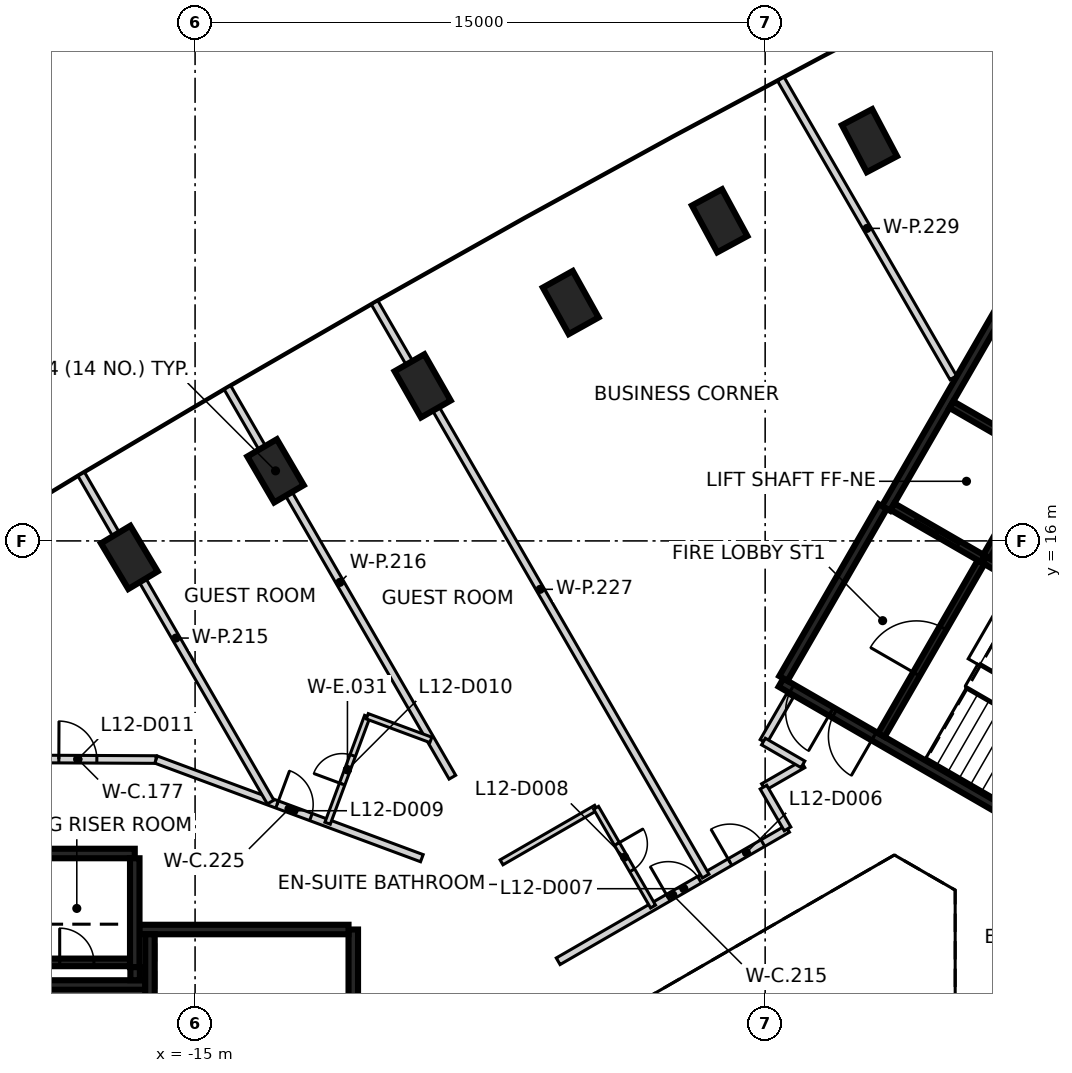
"""IFC4 building model, lengths in metres.
Left out: names, types, materials, properties, quantities, classifications, styles, units other than length and angle.
Written with IfcOpenShell. Run it as: python <this file> out.ifc"""

import sys

from ifc_helpers import new_model, si_unit, direction, frame, frame_2d, origin, origin_2d, place, context, subcontext, project, spatial, rectangle, extrude, element, fill, save


model = new_model("IFC4")
c1 = context("Model", 3, precision=1e-05, world=origin(), true_north=direction((0.0, 1.0)))
c2 = subcontext(c1, "Body", "Model", "MODEL_VIEW")
j1 = project(units=[si_unit("LENGTHUNIT", "METRE"), si_unit("PLANEANGLEUNIT", "RADIAN")], contexts=[c1])
p1 = place(None, origin())
s1 = spatial("IfcSite", under=j1, at=p1, CompositionType="ELEMENT")
p2 = place(p1, origin())
s2 = spatial("IfcBuilding", under=s1, at=p2, CompositionType="ELEMENT")
p3 = place(p2, frame((0.0, 0.0, 56.6)))
s3 = spatial("IfcBuildingStorey", under=s2, at=p3, CompositionType="ELEMENT", Elevation=56.6)
for number, where, z_axis, x_axis in (
    (1, (2.745, 26.531, -0.475), (0.0, 0.0, 1.0), (-0.467, 0.884, 0.0)),
    (2, (-1.197, 24.423, -0.475), (0.0, 0.0, 1.0), (-0.476, 0.879, 0.0)),
    (3, (-5.116, 22.272, -0.475), (0.0, 0.0, 1.0), (-0.486, 0.874, 0.0)),
    (4, (-9.011, 20.079, -0.475), (0.0, 0.0, 1.0), (-0.495, 0.869, 0.0)),
    (5, (-12.883, 17.844, -0.475), (0.0, 0.0, 1.0), (-0.505, 0.863, 0.0)),
    (6, (-16.73, 15.566, -0.475), (0.0, 0.0, 1.0), (-0.514, 0.858, 0.0)),
):
    element("IfcColumn", number, at=place(p3, frame(where, z_axis=z_axis, x_axis=x_axis)), inside=s3, PredefinedType="COLUMN", context=c2, shape_type="SweptSolid", body=[
        extrude(rectangle(XDim=1.4, YDim=0.9, at=origin_2d()), origin(), (0.0, 0.0, 1.0), 3.6),
    ])
p4 = place(p3, frame((-10.837, 5.775, 0.0), z_axis=(0.0, 0.0, 1.0), x_axis=(0.0, -1.0, 0.0)))
e7 = element("IfcWall", 7, at=p4, inside=s3, PredefinedType="SHEAR", context=c2, shape_type="SweptSolid", body=[
    extrude(rectangle(XDim=11.55, YDim=0.25, at=frame_2d((5.775, 0.0))), origin(), (0.0, 0.0, 1.0), 3.125),
])
p5 = place(p4, frame((10.025, 0.0, 0.0)))
e8 = element("IfcOpeningElement", 8, at=p5, cuts=e7, PredefinedType="OPENING", context=c2, shape_type="SweptSolid", body=[
    extrude(rectangle(XDim=1.2, YDim=2.1, at=frame_2d((0.6, 1.05))), frame((0.0, 0.135, 0.0), z_axis=(0.0, -1.0, 0.0), x_axis=(1.0, 0.0, 0.0)), (0.0, 0.0, 1.0), 0.27),
])
p6 = place(p4, frame((8.725, 0.0, 0.0)))
e9 = element("IfcOpeningElement", 9, at=p6, cuts=e7, PredefinedType="OPENING", context=c2, shape_type="SweptSolid", body=[
    extrude(rectangle(XDim=1.2, YDim=2.1, at=frame_2d((0.6, 1.05))), frame((0.0, 0.135, 0.0), z_axis=(0.0, -1.0, 0.0), x_axis=(1.0, 0.0, 0.0)), (0.0, 0.0, 1.0), 0.27),
])
p7 = place(p3, frame((-16.472, 5.775, 0.0), z_axis=(0.0, 0.0, 1.0), x_axis=(1.0, 0.0, 0.0)))
e10 = element("IfcWall", 10, at=p7, inside=s3, PredefinedType="SHEAR", context=c2, shape_type="SweptSolid", body=[
    extrude(rectangle(XDim=5.51, YDim=0.25, at=frame_2d((2.755, 0.0))), origin(), (0.0, 0.0, 1.0), 3.125),
])
p8 = place(p3, frame((-19.637, 7.775, 0.0), z_axis=(0.0, 0.0, 1.0), x_axis=(1.0, 0.0, 0.0)))
e11 = element("IfcWall", 11, at=p8, inside=s3, PredefinedType="SHEAR", context=c2, shape_type="SweptSolid", body=[
    extrude(rectangle(XDim=3.05, YDim=0.25, at=frame_2d((1.525, 0.0))), origin(), (0.0, 0.0, 1.0), 3.125),
])
p9 = place(p3, frame((-16.587, 7.65, 0.0), z_axis=(0.0, 0.0, 1.0), x_axis=(0.0, -1.0, 0.0)))
e12 = element("IfcWall", 12, at=p9, inside=s3, PredefinedType="SHEAR", context=c2, shape_type="SweptSolid", body=[
    extrude(rectangle(XDim=2.865, YDim=0.25, at=frame_2d((1.432, 0.0))), origin(), (0.0, 0.0, 1.0), 3.125),
])
p10 = place(p3, frame((-16.302, 4.315, 0.0), z_axis=(0.0, 0.0, 1.0), x_axis=(-1.0, 0.0, 0.0)))
e13 = element("IfcWall", 13, at=p10, inside=s3, PredefinedType="SHEAR", context=c2, shape_type="SweptSolid", body=[
    extrude(rectangle(XDim=3.085, YDim=0.25, at=frame_2d((1.542, 0.0))), origin(), (0.0, 0.0, 1.0), 3.125),
])
p11 = place(p3, frame((-16.187, 3.2, 0.0), z_axis=(0.0, 0.0, 1.0), x_axis=(0.0, 1.0, 0.0)))
e14 = element("IfcWall", 14, at=p11, inside=s3, PredefinedType="SHEAR", context=c2, shape_type="SweptSolid", body=[
    extrude(rectangle(XDim=2.449, YDim=0.25, at=frame_2d((1.225, 0.0))), origin(), (0.0, 0.0, 1.0), 3.125),
])
p12 = place(p3, frame((-16.577, 4.785, 0.0), z_axis=(0.0, 0.0, 1.0), x_axis=(0.0, -1.0, 0.0)))
e15 = element("IfcWall", 15, at=p12, inside=s3, PredefinedType="SHEAR", context=c2, shape_type="SweptSolid", body=[
    extrude(rectangle(XDim=0.344, YDim=0.25, at=frame_2d((0.172, 0.0))), origin(), (0.0, 0.0, 1.0), 3.125),
])
p13 = place(p3, frame((-19.511, 4.91, 0.0), z_axis=(0.0, 0.0, 1.0), x_axis=(1.0, 0.0, 0.0)))
e16 = element("IfcWall", 16, at=p13, inside=s3, PredefinedType="SHEAR", context=c2, shape_type="SweptSolid", body=[
    extrude(rectangle(XDim=2.798, YDim=0.2, at=frame_2d((1.399, 0.0))), origin(), (0.0, 0.0, 1.0), 3.125),
])
p14 = place(p13, frame((0.949, 0.0, 0.0)))
e17 = element("IfcOpeningElement", 17, at=p14, cuts=e16, PredefinedType="OPENING", context=c2, shape_type="SweptSolid", body=[
    extrude(rectangle(XDim=0.9, YDim=2.1, at=frame_2d((0.45, 1.05))), frame((0.0, 0.11, 0.0), z_axis=(0.0, -1.0, 0.0), x_axis=(1.0, 0.0, 0.0)), (0.0, 0.0, 1.0), 0.22),
])
p15 = place(p3, frame((10.42, 6.498, 0.0), z_axis=(0.0, 0.0, 1.0), x_axis=(-0.866021906294, 0.500006057782, 0.0)))
e18 = element("IfcWall", 18, at=p15, inside=s3, PredefinedType="SHEAR", context=c2, shape_type="SweptSolid", body=[
    extrude(rectangle(XDim=11.55, YDim=0.25, at=frame_2d((5.775, 0.0))), origin(), (0.0, 0.0, 1.0), 3.125),
])
p16 = place(p15, frame((10.025, 0.0, 0.0)))
e19 = element("IfcOpeningElement", 19, at=p16, cuts=e18, PredefinedType="OPENING", context=c2, shape_type="SweptSolid", body=[
    extrude(rectangle(XDim=1.2, YDim=2.1, at=frame_2d((0.6, 1.05))), frame((0.0, 0.135, 0.0), z_axis=(0.0, -1.0, 0.0), x_axis=(1.0, 0.0, 0.0)), (0.0, 0.0, 1.0), 0.27),
])
p17 = place(p15, frame((8.725, 0.0, 0.0)))
e20 = element("IfcOpeningElement", 20, at=p17, cuts=e18, PredefinedType="OPENING", context=c2, shape_type="SweptSolid", body=[
    extrude(rectangle(XDim=1.2, YDim=2.1, at=frame_2d((0.6, 1.05))), frame((0.0, 0.135, 0.0), z_axis=(0.0, -1.0, 0.0), x_axis=(1.0, 0.0, 0.0)), (0.0, 0.0, 1.0), 0.27),
])
p18 = place(p3, frame((3.179, 16.856, 0.0), z_axis=(0.0, 0.0, 1.0), x_axis=(0.500004234368, 0.866022959057, 0.0)))
e21 = element("IfcWall", 21, at=p18, inside=s3, PredefinedType="SHEAR", context=c2, shape_type="SweptSolid", body=[
    extrude(rectangle(XDim=6.25, YDim=0.25, at=frame_2d((3.125, 0.0))), origin(), (0.0, 0.0, 1.0), 3.125),
])
p19 = place(p3, frame((0.48, 12.381, 0.0), z_axis=(0.0, 0.0, 1.0), x_axis=(0.49999885962, 0.866026062182, 0.0)))
e22 = element("IfcWall", 22, at=p19, inside=s3, PredefinedType="SHEAR", context=c2, shape_type="SweptSolid", body=[
    extrude(rectangle(XDim=5.225, YDim=0.25, at=frame_2d((2.612, 0.0))), origin(), (0.0, 0.0, 1.0), 3.125),
])
p20 = place(p3, frame((5.775, 15.502, 0.0), z_axis=(0.0, 0.0, 1.0), x_axis=(0.866020080793, -0.500009219579, 0.0)))
e23 = element("IfcWall", 23, at=p20, inside=s3, PredefinedType="SHEAR", context=c2, shape_type="SweptSolid", body=[
    extrude(rectangle(XDim=5.699, YDim=0.2, at=frame_2d((2.85, 0.0))), origin(), (0.0, 0.0, 1.0), 3.125),
])
p21 = place(p3, frame((3.057, 10.895, 0.0), z_axis=(0.0, 0.0, 1.0), x_axis=(0.499989418164, 0.866031513124, 0.0)))
e24 = element("IfcWall", 24, at=p21, inside=s3, PredefinedType="SHEAR", context=c2, shape_type="SweptSolid", body=[
    extrude(rectangle(XDim=5.251, YDim=0.2, at=frame_2d((2.625, 0.0))), origin(), (0.0, 0.0, 1.0), 3.125),
])
p22 = place(p21, frame((1.849, 0.0, 0.0)))
e25 = element("IfcOpeningElement", 25, at=p22, cuts=e24, PredefinedType="OPENING", context=c2, shape_type="SweptSolid", body=[
    extrude(rectangle(XDim=1.4, YDim=2.1, at=frame_2d((0.7, 1.05))), frame((0.0, 0.11, 0.0), z_axis=(0.0, -1.0, 0.0), x_axis=(1.0, 0.0, 0.0)), (0.0, 0.0, 1.0), 0.22),
])
p23 = place(p3, frame((7.199, 17.97, 0.0), z_axis=(0.0, 0.0, 1.0), x_axis=(-0.499968400327, -0.866043647095, 0.0)))
e26 = element("IfcWall", 26, at=p23, inside=s3, PredefinedType="SHEAR", context=c2, shape_type="SweptSolid", body=[
    extrude(rectangle(XDim=2.75, YDim=0.2, at=frame_2d((1.375, 0.0))), origin(), (0.0, 0.0, 1.0), 3.125),
])
p24 = place(p3, frame((5.725, 15.531, 0.0), z_axis=(0.0, 0.0, 1.0), x_axis=(-0.866037306777, 0.499979382845, 0.0)))
e27 = element("IfcWall", 27, at=p24, inside=s3, PredefinedType="SHEAR", context=c2, shape_type="SweptSolid", body=[
    extrude(rectangle(XDim=2.742, YDim=0.2, at=frame_2d((1.371, 0.0))), origin(), (0.0, 0.0, 1.0), 3.125),
])
p25 = place(p24, frame((0.743, 0.0, 0.0)))
e28 = element("IfcOpeningElement", 28, at=p25, cuts=e27, PredefinedType="OPENING", context=c2, shape_type="SweptSolid", body=[
    extrude(rectangle(XDim=1.3, YDim=2.1, at=frame_2d((0.65, 1.05))), frame((0.0, 0.11, 0.0), z_axis=(0.0, -1.0, 0.0), x_axis=(1.0, 0.0, 0.0)), (0.0, 0.0, 1.0), 0.22),
])
p26 = place(p3, frame((4.901, 19.586, 0.0), z_axis=(0.0, 0.0, 1.0), x_axis=(0.866022890907, -0.500004352405, 0.0)))
e29 = element("IfcWall", 29, at=p26, inside=s3, PredefinedType="SHEAR", context=c2, shape_type="SweptSolid", body=[
    extrude(rectangle(XDim=2.799, YDim=0.2, at=frame_2d((1.399, 0.0))), origin(), (0.0, 0.0, 1.0), 3.125),
])
p27 = place(p3, frame((-20.143, 10.266, 0.0), z_axis=(0.0, 0.0, 1.0), x_axis=(0.999989297417, -0.004626559416, 0.0)))
e30 = element("IfcWall", 30, at=p27, inside=s3, PredefinedType="PARTITIONING", context=c2, shape_type="SweptSolid", body=[
    extrude(rectangle(XDim=4.116, YDim=0.2, at=frame_2d((2.058, 0.0))), origin(), (0.0, 0.0, 1.0), 3.125),
])
p28 = place(p27, frame((1.558, 0.0, 0.0)))
e31 = element("IfcOpeningElement", 31, at=p28, cuts=e30, PredefinedType="OPENING", context=c2, shape_type="SweptSolid", body=[
    extrude(rectangle(XDim=1.0, YDim=2.1, at=frame_2d((0.5, 1.05))), frame((0.0, 0.11, 0.0), z_axis=(0.0, -1.0, 0.0), x_axis=(1.0, 0.0, 0.0)), (0.0, 0.0, 1.0), 0.22),
])
p29 = place(p3, frame((-16.026, 10.247, 0.0), z_axis=(0.0, 0.0, 1.0), x_axis=(0.937540909117, -0.347875040397, 0.0)))
e32 = element("IfcWall", 32, at=p29, inside=s3, PredefinedType="PARTITIONING", context=c2, shape_type="SweptSolid", body=[
    extrude(rectangle(XDim=7.459, YDim=0.2, at=frame_2d((3.729, 0.0))), origin(), (0.0, 0.0, 1.0), 3.125),
])
p30 = place(p29, frame((3.396, 0.0, 0.0)))
e33 = element("IfcOpeningElement", 33, at=p30, cuts=e32, PredefinedType="OPENING", context=c2, shape_type="SweptSolid", body=[
    extrude(rectangle(XDim=0.95, YDim=2.1, at=frame_2d((0.475, 1.05))), frame((0.0, 0.11, 0.0), z_axis=(0.0, -1.0, 0.0), x_axis=(1.0, 0.0, 0.0)), (0.0, 0.0, 1.0), 0.22),
])
p31 = place(p3, frame((-5.446, 4.94, 0.0), z_axis=(0.0, 0.0, 1.0), x_axis=(0.866096332545, 0.499877127655, 0.0)))
e34 = element("IfcWall", 34, at=p31, inside=s3, PredefinedType="PARTITIONING", context=c2, shape_type="SweptSolid", body=[
    extrude(rectangle(XDim=6.969, YDim=0.2, at=frame_2d((3.484, 0.0))), origin(), (0.0, 0.0, 1.0), 3.125),
])
p32 = place(p31, frame((5.219, 0.0, 0.0)))
e35 = element("IfcOpeningElement", 35, at=p32, cuts=e34, PredefinedType="OPENING", context=c2, shape_type="SweptSolid", body=[
    extrude(rectangle(XDim=1.0, YDim=2.1, at=frame_2d((0.5, 1.05))), frame((0.0, 0.11, 0.0), z_axis=(0.0, -1.0, 0.0), x_axis=(1.0, 0.0, 0.0)), (0.0, 0.0, 1.0), 0.22),
])
p33 = place(p31, frame((3.344, 0.0, 0.0)))
e36 = element("IfcOpeningElement", 36, at=p33, cuts=e34, PredefinedType="OPENING", context=c2, shape_type="SweptSolid", body=[
    extrude(rectangle(XDim=0.95, YDim=2.1, at=frame_2d((0.475, 1.05))), frame((0.0, 0.11, 0.0), z_axis=(0.0, -1.0, 0.0), x_axis=(1.0, 0.0, 0.0)), (0.0, 0.0, 1.0), 0.22),
])
p34 = place(p3, frame((-0.045, 9.522, 0.0), z_axis=(0.0, 0.0, 1.0), x_axis=(0.86625675314, 0.499599076899, 0.0)))
e37 = element("IfcWall", 37, at=p34, inside=s3, PredefinedType="PARTITIONING", context=c2, shape_type="SweptSolid", body=[
    extrude(rectangle(XDim=1.199, YDim=0.2, at=frame_2d((0.6, 0.0))), origin(), (0.0, 0.0, 1.0), 3.125),
])
p35 = place(p3, frame((-0.045, 10.722, 0.0), z_axis=(0.0, 0.0, 1.0), x_axis=(0.500107785535, 0.865963164833, 0.0)))
e38 = element("IfcWall", 38, at=p35, inside=s3, PredefinedType="PARTITIONING", context=c2, shape_type="SweptSolid", body=[
    extrude(rectangle(XDim=1.389, YDim=0.2, at=frame_2d((0.695, 0.0))), origin(), (0.0, 0.0, 1.0), 3.125),
])
p36 = place(p3, frame((-0.045, 9.521, 0.0), z_axis=(0.0, 0.0, 1.0), x_axis=(0.500094716449, -0.865970712311, 0.0)))
e39 = element("IfcWall", 39, at=p36, inside=s3, PredefinedType="PARTITIONING", context=c2, shape_type="SweptSolid", body=[
    extrude(rectangle(XDim=1.268, YDim=0.2, at=frame_2d((0.634, 0.0))), origin(), (0.0, 0.0, 1.0), 3.125),
])
p37 = place(p3, frame((-0.045, 10.721, 0.0), z_axis=(0.0, 0.0, 1.0), x_axis=(0.865992388649, -0.500057179532, 0.0)))
e40 = element("IfcWall", 40, at=p37, inside=s3, PredefinedType="PARTITIONING", context=c2, shape_type="SweptSolid", body=[
    extrude(rectangle(XDim=1.199, YDim=0.2, at=frame_2d((0.6, 0.0))), origin(), (0.0, 0.0, 1.0), 3.125),
])
p38 = place(p3, frame((-17.996, 17.758, 0.0), z_axis=(0.0, 0.0, 1.0), x_axis=(0.500046945013, -0.865998298372, 0.0)))
e41 = element("IfcWall", 41, at=p38, inside=s3, PredefinedType="PARTITIONING", context=c2, shape_type="SweptSolid", body=[
    extrude(rectangle(XDim=9.964, YDim=0.2, at=frame_2d((4.982, 0.0))), origin(), (0.0, 0.0, 1.0), 3.125),
])
p39 = place(p3, frame((-14.149, 20.035, 0.0), z_axis=(0.0, 0.0, 1.0), x_axis=(0.500022967158, -0.866012143284, 0.0)))
e42 = element("IfcWall", 42, at=p39, inside=s3, PredefinedType="PARTITIONING", context=c2, shape_type="SweptSolid", body=[
    extrude(rectangle(XDim=11.838, YDim=0.2, at=frame_2d((5.919, 0.0))), origin(), (0.0, 0.0, 1.0), 3.125),
])
p40 = place(p3, frame((-10.276, 22.271, 0.0), z_axis=(0.0, 0.0, 1.0), x_axis=(0.499975954304, -0.866039286129, 0.0)))
e43 = element("IfcWall", 43, at=p40, inside=s3, PredefinedType="PARTITIONING", context=c2, shape_type="SweptSolid", body=[
    extrude(rectangle(XDim=17.424, YDim=0.2, at=frame_2d((8.712, 0.0))), origin(), (0.0, 0.0, 1.0), 3.125),
])
p41 = place(p3, frame((0.412, 28.153, 0.0), z_axis=(0.0, 0.0, 1.0), x_axis=(0.500039143415, -0.866002803143, 0.0)))
e44 = element("IfcWall", 44, at=p41, inside=s3, PredefinedType="PARTITIONING", context=c2, shape_type="SweptSolid", body=[
    extrude(rectangle(XDim=9.075, YDim=0.2, at=frame_2d((4.538, 0.0))), origin(), (0.0, 0.0, 1.0), 2.225),
])
p42 = place(p3, frame((-11.513, 8.572, 0.0), z_axis=(0.0, 0.0, 1.0), x_axis=(0.347929104424, 0.937520846859, 0.0)))
e45 = element("IfcWall", 45, at=p42, inside=s3, PredefinedType="PARTITIONING", context=c2, shape_type="SweptSolid", body=[
    extrude(rectangle(XDim=3.0, YDim=0.15, at=frame_2d((1.5, 0.0))), origin(), (0.0, 0.0, 1.0), 3.125),
])
p43 = place(p42, frame((1.1, 0.0, 0.0)))
e46 = element("IfcOpeningElement", 46, at=p43, cuts=e45, PredefinedType="OPENING", context=c2, shape_type="SweptSolid", body=[
    extrude(rectangle(XDim=0.8, YDim=2.1, at=frame_2d((0.4, 1.05))), frame((0.0, 0.085, 0.0), z_axis=(0.0, -1.0, 0.0), x_axis=(1.0, 0.0, 0.0)), (0.0, 0.0, 1.0), 0.17),
])
p44 = place(p3, frame((-10.469, 11.385, 0.0), z_axis=(0.0, 0.0, 1.0), x_axis=(0.937487768635, -0.348018223173, 0.0)))
e47 = element("IfcWall", 47, at=p44, inside=s3, PredefinedType="PARTITIONING", context=c2, shape_type="SweptSolid", body=[
    extrude(rectangle(XDim=1.785, YDim=0.15, at=frame_2d((0.892, 0.0))), origin(), (0.0, 0.0, 1.0), 3.125),
])
p45 = place(p3, frame((-6.936, 7.543, 0.0), z_axis=(0.0, 0.0, 1.0), x_axis=(0.866153027342, 0.499778884334, 0.0)))
e48 = element("IfcWall", 48, at=p45, inside=s3, PredefinedType="PARTITIONING", context=c2, shape_type="SweptSolid", body=[
    extrude(rectangle(XDim=2.871, YDim=0.15, at=frame_2d((1.436, 0.0))), origin(), (0.0, 0.0, 1.0), 3.125),
])
p46 = place(p3, frame((-4.449, 8.978, 0.0), z_axis=(0.0, 0.0, 1.0), x_axis=(0.499745940409, -0.866172035478, 0.0)))
e49 = element("IfcWall", 49, at=p46, inside=s3, PredefinedType="PARTITIONING", context=c2, shape_type="SweptSolid", body=[
    extrude(rectangle(XDim=3.0, YDim=0.15, at=frame_2d((1.5, 0.0))), origin(), (0.0, 0.0, 1.0), 3.125),
])
p47 = place(p46, frame((1.1, 0.0, 0.0)))
e50 = element("IfcOpeningElement", 50, at=p47, cuts=e49, PredefinedType="OPENING", context=c2, shape_type="SweptSolid", body=[
    extrude(rectangle(XDim=0.8, YDim=2.1, at=frame_2d((0.4, 1.05))), frame((0.0, 0.085, 0.0), z_axis=(0.0, -1.0, 0.0), x_axis=(1.0, 0.0, 0.0)), (0.0, 0.0, 1.0), 0.17),
])
p48 = place(p14, origin())
e51 = element("IfcDoor", 51, at=p48, inside=s3, OperationType="SINGLE_SWING_LEFT", PredefinedType="DOOR", context=c2, shape_type="SweptSolid", body=[
    extrude(rectangle(XDim=0.9, YDim=2.1, at=frame_2d((0.45, 1.05))), frame((0.0, 0.025, 0.0), z_axis=(0.0, -1.0, 0.0), x_axis=(1.0, 0.0, 0.0)), (0.0, 0.0, 1.0), 0.05),
])
fill(e17, e51)
p49 = place(p25, origin())
e52 = element("IfcDoor", 52, at=p49, inside=s3, OperationType="SLIDING_TO_RIGHT", PredefinedType="DOOR", context=c2, shape_type="SweptSolid", body=[
    extrude(rectangle(XDim=1.3, YDim=2.1, at=frame_2d((0.65, 1.05))), frame((0.0, 0.025, 0.0), z_axis=(0.0, -1.0, 0.0), x_axis=(1.0, 0.0, 0.0)), (0.0, 0.0, 1.0), 0.05),
])
fill(e28, e52)
p50 = place(p16, origin())
e53 = element("IfcDoor", 53, at=p50, inside=s3, OperationType="SINGLE_SWING_LEFT", PredefinedType="DOOR", context=c2, shape_type="SweptSolid", body=[
    extrude(rectangle(XDim=1.2, YDim=2.1, at=frame_2d((0.6, 1.05))), frame((0.0, 0.025, 0.0), z_axis=(0.0, -1.0, 0.0), x_axis=(1.0, 0.0, 0.0)), (0.0, 0.0, 1.0), 0.05),
])
fill(e19, e53)
p51 = place(p17, origin())
e54 = element("IfcDoor", 54, at=p51, inside=s3, OperationType="SINGLE_SWING_RIGHT", PredefinedType="DOOR", context=c2, shape_type="SweptSolid", body=[
    extrude(rectangle(XDim=1.2, YDim=2.1, at=frame_2d((0.6, 1.05))), frame((0.0, 0.025, 0.0), z_axis=(0.0, -1.0, 0.0), x_axis=(1.0, 0.0, 0.0)), (0.0, 0.0, 1.0), 0.05),
])
fill(e20, e54)
p52 = place(p22, origin())
e55 = element("IfcDoor", 55, at=p52, inside=s3, OperationType="SINGLE_SWING_RIGHT", PredefinedType="DOOR", context=c2, shape_type="SweptSolid", body=[
    extrude(rectangle(XDim=1.4, YDim=2.1, at=frame_2d((0.7, 1.05))), frame((0.0, 0.025, 0.0), z_axis=(0.0, -1.0, 0.0), x_axis=(1.0, 0.0, 0.0)), (0.0, 0.0, 1.0), 0.05),
])
fill(e25, e55)
p53 = place(p32, origin())
e56 = element("IfcDoor", 56, at=p53, inside=s3, OperationType="SINGLE_SWING_LEFT", PredefinedType="DOOR", context=c2, shape_type="SweptSolid", body=[
    extrude(rectangle(XDim=1.0, YDim=2.1, at=frame_2d((0.5, 1.05))), frame((0.0, 0.025, 0.0), z_axis=(0.0, -1.0, 0.0), x_axis=(1.0, 0.0, 0.0)), (0.0, 0.0, 1.0), 0.05),
])
fill(e35, e56)
p54 = place(p33, origin())
e57 = element("IfcDoor", 57, at=p54, inside=s3, OperationType="SINGLE_SWING_LEFT", PredefinedType="DOOR", context=c2, shape_type="SweptSolid", body=[
    extrude(rectangle(XDim=0.95, YDim=2.1, at=frame_2d((0.475, 1.05))), frame((0.0, 0.025, 0.0), z_axis=(0.0, -1.0, 0.0), x_axis=(1.0, 0.0, 0.0)), (0.0, 0.0, 1.0), 0.05),
])
fill(e36, e57)
p55 = place(p47, frame((0.8, 0.0, 0.0), z_axis=(0.0, 0.0, 1.0), x_axis=(-1.0, 0.0, 0.0)))
e58 = element("IfcDoor", 58, at=p55, inside=s3, OperationType="SINGLE_SWING_LEFT", PredefinedType="DOOR", context=c2, shape_type="SweptSolid", body=[
    extrude(rectangle(XDim=0.8, YDim=2.1, at=frame_2d((0.4, 1.05))), frame((0.0, 0.025, 0.0), z_axis=(0.0, -1.0, 0.0), x_axis=(1.0, 0.0, 0.0)), (0.0, 0.0, 1.0), 0.05),
])
fill(e50, e58)
p56 = place(p30, origin())
e59 = element("IfcDoor", 59, at=p56, inside=s3, OperationType="SINGLE_SWING_LEFT", PredefinedType="DOOR", context=c2, shape_type="SweptSolid", body=[
    extrude(rectangle(XDim=0.95, YDim=2.1, at=frame_2d((0.475, 1.05))), frame((0.0, 0.025, 0.0), z_axis=(0.0, -1.0, 0.0), x_axis=(1.0, 0.0, 0.0)), (0.0, 0.0, 1.0), 0.05),
])
fill(e33, e59)
p57 = place(p43, origin())
e60 = element("IfcDoor", 60, at=p57, inside=s3, OperationType="SINGLE_SWING_LEFT", PredefinedType="DOOR", context=c2, shape_type="SweptSolid", body=[
    extrude(rectangle(XDim=0.8, YDim=2.1, at=frame_2d((0.4, 1.05))), frame((0.0, 0.025, 0.0), z_axis=(0.0, -1.0, 0.0), x_axis=(1.0, 0.0, 0.0)), (0.0, 0.0, 1.0), 0.05),
])
fill(e46, e60)
p58 = place(p28, origin())
e61 = element("IfcDoor", 61, at=p58, inside=s3, OperationType="SINGLE_SWING_LEFT", PredefinedType="DOOR", context=c2, shape_type="SweptSolid", body=[
    extrude(rectangle(XDim=1.0, YDim=2.1, at=frame_2d((0.5, 1.05))), frame((0.0, 0.025, 0.0), z_axis=(0.0, -1.0, 0.0), x_axis=(1.0, 0.0, 0.0)), (0.0, 0.0, 1.0), 0.05),
])
fill(e31, e61)
save(model, sys.argv[1])
